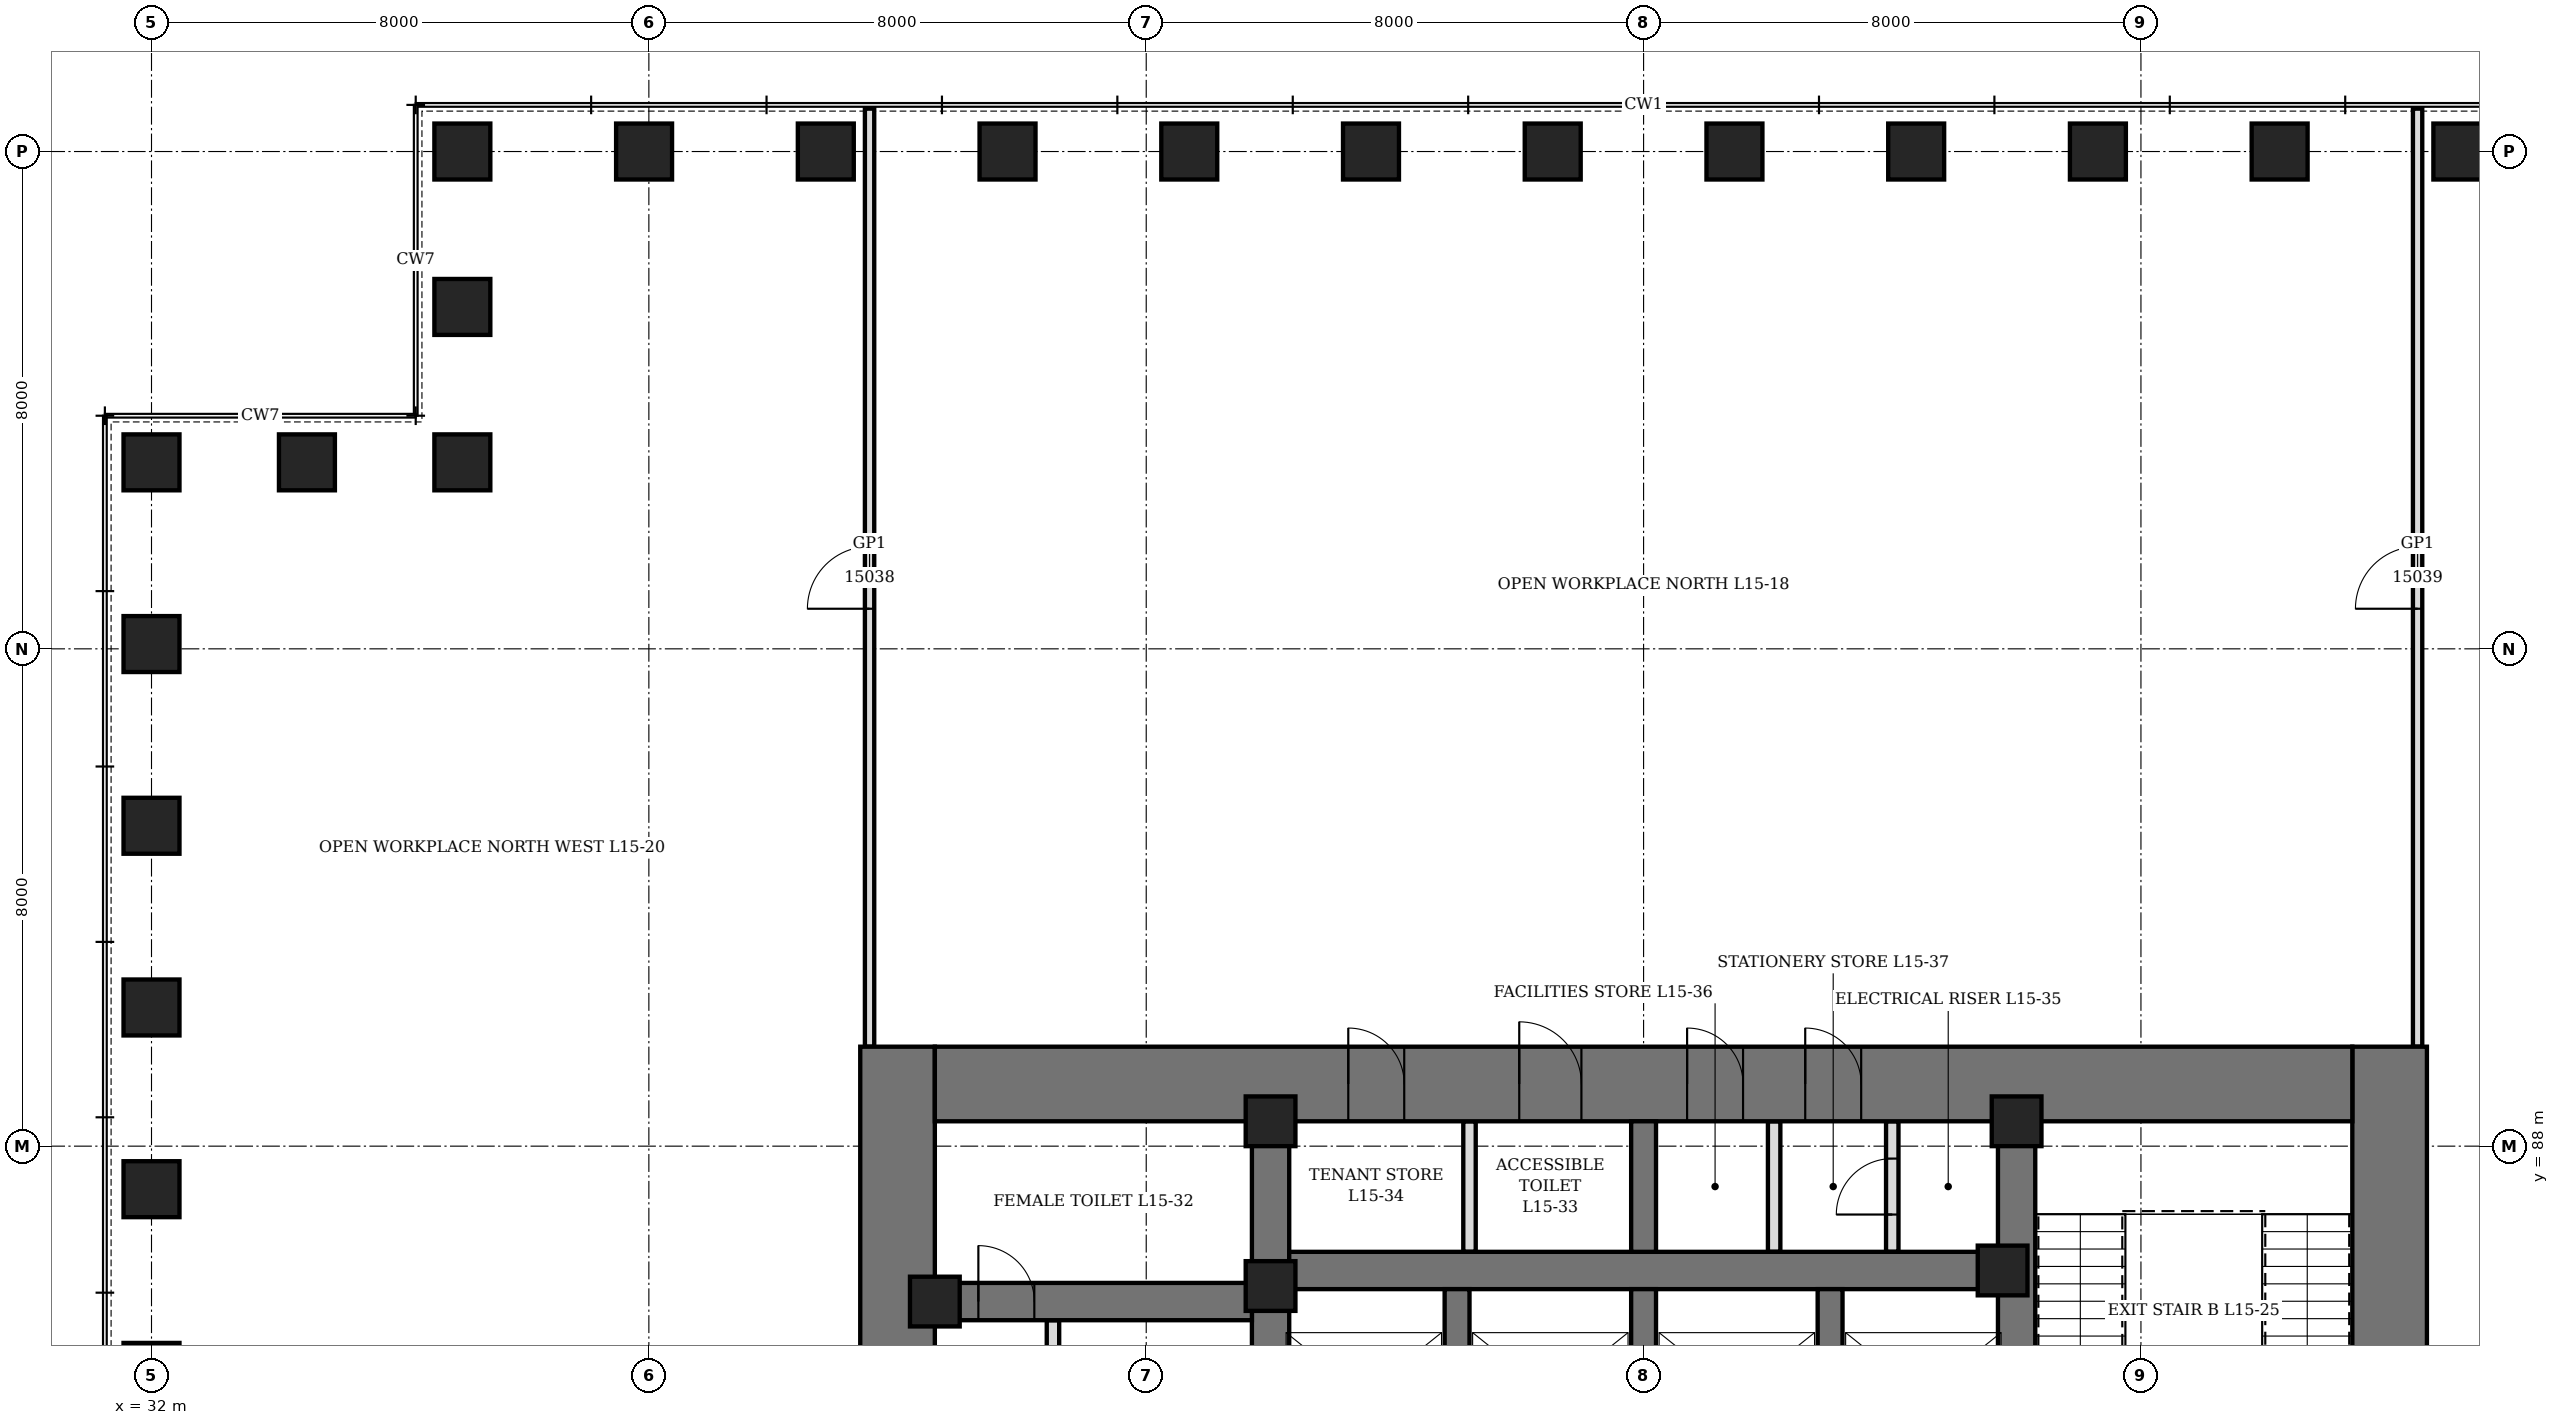
"""IFC4 building model, lengths in metres.
Left out: names, types, materials, properties, quantities, classifications, styles, units other than length and angle.
Written with IfcOpenShell. Run it as: python <this file> out.ifc"""

import sys

from ifc_helpers import new_model, si_unit, direction, frame, frame_2d, origin, origin_2d, place, context, subcontext, project, spatial, rectangle, hollow_rectangle, extrude, element, fill, save


model = new_model("IFC4")
c1 = context("Model", 3, precision=1e-05, world=origin(), true_north=direction((0.0, 1.0)))
c2 = subcontext(c1, "Body", "Model", "MODEL_VIEW")
j1 = project(units=[si_unit("LENGTHUNIT", "METRE"), si_unit("PLANEANGLEUNIT", "RADIAN")], contexts=[c1])
p1 = place(None, origin())
s1 = spatial("IfcSite", under=j1, at=p1, CompositionType="ELEMENT")
p2 = place(p1, origin())
s2 = spatial("IfcBuilding", under=s1, at=p2, CompositionType="ELEMENT")
p3 = place(p2, frame((0.0, 0.0, 72.7)))
s3 = spatial("IfcBuildingStorey", under=s2, at=p3, CompositionType="ELEMENT", Elevation=72.7)
for number, where, z_axis, x_axis in (
    (1, (69.154, 104.0, 0.0), (0.0, 0.0, 1.0), (1.0, 0.0, 0.0)),
    (2, (66.231, 104.0, 0.0), (0.0, 0.0, 1.0), (1.0, 0.0, 0.0)),
    (3, (63.308, 104.0, 0.0), (0.0, 0.0, 1.0), (1.0, 0.0, 0.0)),
    (4, (60.385, 104.0, 0.0), (0.0, 0.0, 1.0), (1.0, 0.0, 0.0)),
    (5, (57.461, 104.0, 0.0), (0.0, 0.0, 1.0), (1.0, 0.0, 0.0)),
    (6, (54.539, 104.0, 0.0), (0.0, 0.0, 1.0), (1.0, 0.0, 0.0)),
    (7, (51.615, 104.0, 0.0), (0.0, 0.0, 1.0), (1.0, 0.0, 0.0)),
    (8, (48.692, 104.0, 0.0), (0.0, 0.0, 1.0), (1.0, 0.0, 0.0)),
    (9, (45.769, 104.0, 0.0), (0.0, 0.0, 1.0), (1.0, 0.0, 0.0)),
    (10, (42.846, 104.0, 0.0), (0.0, 0.0, 1.0), (1.0, 0.0, 0.0)),
    (11, (39.923, 104.0, 0.0), (0.0, 0.0, 1.0), (1.0, 0.0, 0.0)),
    (12, (37.0, 104.0, 0.0), (0.0, 0.0, 1.0), (0.0, 1.0, 0.0)),
    (13, (37.0, 101.5, 0.0), (0.0, 0.0, 1.0), (0.0, 1.0, 0.0)),
    (14, (37.0, 99.0, 0.0), (0.0, 0.0, 1.0), (1.0, 0.0, 0.0)),
    (15, (34.5, 99.0, 0.0), (0.0, 0.0, 1.0), (1.0, 0.0, 0.0)),
    (16, (32.0, 99.0, 0.0), (0.0, 0.0, 1.0), (0.0, 1.0, 0.0)),
    (17, (32.0, 96.077, 0.0), (0.0, 0.0, 1.0), (0.0, 1.0, 0.0)),
    (18, (32.0, 93.154, 0.0), (0.0, 0.0, 1.0), (0.0, 1.0, 0.0)),
    (19, (32.0, 90.231, 0.0), (0.0, 0.0, 1.0), (0.0, 1.0, 0.0)),
    (20, (32.0, 87.308, 0.0), (0.0, 0.0, 1.0), (0.0, 1.0, 0.0)),
    (21, (32.0, 84.385, 0.0), (0.0, 0.0, 1.0), (0.0, 1.0, 0.0)),
):
    element("IfcColumn", number, at=place(p3, frame(where, z_axis=z_axis, x_axis=x_axis)), inside=s3, PredefinedType="COLUMN", context=c2, shape_type="SweptSolid", body=[
        extrude(hollow_rectangle(XDim=0.9, YDim=0.9, WallThickness=0.12, at=origin_2d()), origin(), (0.0, 0.0, 1.0), 4.2),
    ])
p4 = place(p3, frame((44.0, 70.4, 0.0), z_axis=(0.0, 0.0, 1.0), x_axis=(0.0, 1.0, 0.0)))
e22 = element("IfcWall", 22, at=p4, inside=s3, PredefinedType="SHEAR", context=c2, shape_type="SweptSolid", body=[
    extrude(rectangle(XDim=19.2, YDim=1.2, at=frame_2d((9.6, 0.0))), origin(), (0.0, 0.0, 1.0), 4.2),
])
p5 = place(p4, frame((8.6, 0.0, 0.0)))
e23 = element("IfcOpeningElement", 23, at=p5, cuts=e22, PredefinedType="OPENING", context=c2, shape_type="SweptSolid", body=[
    extrude(rectangle(XDim=2.0, YDim=2.4, at=frame_2d((1.0, 1.2))), frame((0.0, 0.61, 0.0), z_axis=(0.0, -1.0, 0.0), x_axis=(1.0, 0.0, 0.0)), (0.0, 0.0, 1.0), 1.22),
])
p6 = place(p3, frame((68.0, 70.4, 0.0), z_axis=(0.0, 0.0, 1.0), x_axis=(0.0, 1.0, 0.0)))
e24 = element("IfcWall", 24, at=p6, inside=s3, PredefinedType="SHEAR", context=c2, shape_type="SweptSolid", body=[
    extrude(rectangle(XDim=19.2, YDim=1.2, at=frame_2d((9.6, 0.0))), origin(), (0.0, 0.0, 1.0), 4.2),
])
p7 = place(p6, frame((8.6, 0.0, 0.0)))
e25 = element("IfcOpeningElement", 25, at=p7, cuts=e24, PredefinedType="OPENING", context=c2, shape_type="SweptSolid", body=[
    extrude(rectangle(XDim=2.0, YDim=2.4, at=frame_2d((1.0, 1.2))), frame((0.0, 0.61, 0.0), z_axis=(0.0, -1.0, 0.0), x_axis=(1.0, 0.0, 0.0)), (0.0, 0.0, 1.0), 1.22),
])
p8 = place(p3, frame((44.6, 89.0, 0.0), z_axis=(0.0, 0.0, 1.0), x_axis=(1.0, 0.0, 0.0)))
e26 = element("IfcWall", 26, at=p8, inside=s3, PredefinedType="SHEAR", context=c2, shape_type="SweptSolid", body=[
    extrude(rectangle(XDim=22.8, YDim=1.2, at=frame_2d((11.4, 0.0))), origin(), (0.0, 0.0, 1.0), 4.2),
])
p9 = place(p8, frame((9.4, 0.0, 0.0)))
e27 = element("IfcOpeningElement", 27, at=p9, cuts=e26, PredefinedType="OPENING", context=c2, shape_type="SweptSolid", body=[
    extrude(rectangle(XDim=1.0, YDim=2.1, at=frame_2d((0.5, 1.05))), frame((0.0, 0.61, 0.0), z_axis=(0.0, -1.0, 0.0), x_axis=(1.0, 0.0, 0.0)), (0.0, 0.0, 1.0), 1.22),
])
p10 = place(p8, frame((6.65, 0.0, 0.0)))
e28 = element("IfcOpeningElement", 28, at=p10, cuts=e26, PredefinedType="OPENING", context=c2, shape_type="SweptSolid", body=[
    extrude(rectangle(XDim=0.9, YDim=2.1, at=frame_2d((0.45, 1.05))), frame((0.0, 0.61, 0.0), z_axis=(0.0, -1.0, 0.0), x_axis=(1.0, 0.0, 0.0)), (0.0, 0.0, 1.0), 1.22),
])
p11 = place(p8, frame((12.1, 0.0, 0.0)))
e29 = element("IfcOpeningElement", 29, at=p11, cuts=e26, PredefinedType="OPENING", context=c2, shape_type="SweptSolid", body=[
    extrude(rectangle(XDim=0.9, YDim=2.1, at=frame_2d((0.45, 1.05))), frame((0.0, 0.61, 0.0), z_axis=(0.0, -1.0, 0.0), x_axis=(1.0, 0.0, 0.0)), (0.0, 0.0, 1.0), 1.22),
])
p12 = place(p8, frame((14.0, 0.0, 0.0)))
e30 = element("IfcOpeningElement", 30, at=p12, cuts=e26, PredefinedType="OPENING", context=c2, shape_type="SweptSolid", body=[
    extrude(rectangle(XDim=0.9, YDim=2.1, at=frame_2d((0.45, 1.05))), frame((0.0, 0.61, 0.0), z_axis=(0.0, -1.0, 0.0), x_axis=(1.0, 0.0, 0.0)), (0.0, 0.0, 1.0), 1.22),
])
p13 = place(p3, frame((50.0, 71.6, 0.0), z_axis=(0.0, 0.0, 1.0), x_axis=(0.0, 1.0, 0.0)))
e31 = element("IfcWall", 31, at=p13, inside=s3, PredefinedType="SHEAR", context=c2, shape_type="SweptSolid", body=[
    extrude(rectangle(XDim=16.8, YDim=0.6, at=frame_2d((8.4, 0.0))), origin(), (0.0, 0.0, 1.0), 4.2),
])
p14 = place(p13, frame((7.5, 0.0, 0.0)))
e32 = element("IfcOpeningElement", 32, at=p14, cuts=e31, PredefinedType="OPENING", context=c2, shape_type="SweptSolid", body=[
    extrude(rectangle(XDim=1.8, YDim=2.4, at=frame_2d((0.9, 1.2))), frame((0.0, 0.31, 0.0), z_axis=(0.0, -1.0, 0.0), x_axis=(1.0, 0.0, 0.0)), (0.0, 0.0, 1.0), 0.62),
])
p15 = place(p3, frame((62.0, 71.6, 0.0), z_axis=(0.0, 0.0, 1.0), x_axis=(0.0, 1.0, 0.0)))
e33 = element("IfcWall", 33, at=p15, inside=s3, PredefinedType="SHEAR", context=c2, shape_type="SweptSolid", body=[
    extrude(rectangle(XDim=16.8, YDim=0.6, at=frame_2d((8.4, 0.0))), origin(), (0.0, 0.0, 1.0), 4.2),
])
p16 = place(p15, frame((7.5, 0.0, 0.0)))
e34 = element("IfcOpeningElement", 34, at=p16, cuts=e33, PredefinedType="OPENING", context=c2, shape_type="SweptSolid", body=[
    extrude(rectangle(XDim=1.8, YDim=2.4, at=frame_2d((0.9, 1.2))), frame((0.0, 0.31, 0.0), z_axis=(0.0, -1.0, 0.0), x_axis=(1.0, 0.0, 0.0)), (0.0, 0.0, 1.0), 0.62),
])
p17 = place(p3, frame((44.6, 85.5, 0.0), z_axis=(0.0, 0.0, 1.0), x_axis=(1.0, 0.0, 0.0)))
e35 = element("IfcWall", 35, at=p17, inside=s3, PredefinedType="SHEAR", context=c2, shape_type="SweptSolid", body=[
    extrude(rectangle(XDim=5.1, YDim=0.6, at=frame_2d((2.55, 0.0))), origin(), (0.0, 0.0, 1.0), 4.2),
])
p18 = place(p17, frame((0.7, 0.0, 0.0)))
e36 = element("IfcOpeningElement", 36, at=p18, cuts=e35, PredefinedType="OPENING", context=c2, shape_type="SweptSolid", body=[
    extrude(rectangle(XDim=0.9, YDim=2.1, at=frame_2d((0.45, 1.05))), frame((0.0, 0.31, 0.0), z_axis=(0.0, -1.0, 0.0), x_axis=(1.0, 0.0, 0.0)), (0.0, 0.0, 1.0), 0.62),
])
p19 = place(p3, frame((50.3, 86.0, 0.0), z_axis=(0.0, 0.0, 1.0), x_axis=(1.0, 0.0, 0.0)))
e37 = element("IfcWall", 37, at=p19, inside=s3, PredefinedType="SHEAR", context=c2, shape_type="SweptSolid", body=[
    extrude(rectangle(XDim=11.4, YDim=0.6, at=frame_2d((5.7, 0.0))), origin(), (0.0, 0.0, 1.0), 4.2),
])
for number, where, z_axis, x_axis in (
    (38, (53.0, 82.3, 0.0), (0.0, 0.0, 1.0), (0.0, 1.0, 0.0)),
    (39, (56.0, 82.3, 0.0), (0.0, 0.0, 1.0), (0.0, 1.0, 0.0)),
    (40, (59.0, 82.3, 0.0), (0.0, 0.0, 1.0), (0.0, 1.0, 0.0)),
):
    element("IfcWall", number, at=place(p3, frame(where, z_axis=z_axis, x_axis=x_axis)), inside=s3, PredefinedType="SHEAR", context=c2, shape_type="SweptSolid", body=[
        extrude(rectangle(XDim=3.4, YDim=0.4, at=frame_2d((1.7, 0.0))), origin(), (0.0, 0.0, 1.0), 4.2),
    ])
p20 = place(p3, frame((56.0, 86.3, 0.0), z_axis=(0.0, 0.0, 1.0), x_axis=(0.0, 1.0, 0.0)))
e41 = element("IfcWall", 41, at=p20, inside=s3, PredefinedType="SHEAR", context=c2, shape_type="SweptSolid", body=[
    extrude(rectangle(XDim=2.1, YDim=0.4, at=frame_2d((1.05, 0.0))), origin(), (0.0, 0.0, 1.0), 4.2),
])
for number, where, z_axis, x_axis in (
    (42, (44.6, 85.5, 0.0), (0.0, 0.0, 1.0), (1.0, 0.0, 0.0)),
    (43, (50.0, 85.75, 0.0), (0.0, 0.0, 1.0), (1.0, 0.0, 0.0)),
    (44, (50.0, 88.4, 0.0), (0.0, 0.0, 1.0), (1.0, 0.0, 0.0)),
    (45, (61.775, 86.0, 0.0), (0.0, 0.0, 1.0), (1.0, 0.0, 0.0)),
    (46, (62.0, 88.4, 0.0), (0.0, 0.0, 1.0), (1.0, 0.0, 0.0)),
):
    element("IfcColumn", number, at=place(p3, frame(where, z_axis=z_axis, x_axis=x_axis)), inside=s3, PredefinedType="COLUMN", context=c2, shape_type="SweptSolid", body=[
        extrude(hollow_rectangle(XDim=0.8, YDim=0.8, WallThickness=0.1, at=origin_2d()), origin(), (0.0, 0.0, 1.0), 4.2),
    ])
p21 = place(p3, frame((46.5, 82.3, 0.0), z_axis=(0.0, 0.0, 1.0), x_axis=(0.0, 1.0, 0.0)))
e47 = element("IfcWall", 47, at=p21, inside=s3, PredefinedType="PARTITIONING", context=c2, shape_type="SweptSolid", body=[
    extrude(rectangle(XDim=2.9, YDim=0.2, at=frame_2d((1.45, 0.0))), origin(), (0.0, 0.0, 1.0), 4.04),
])
p22 = place(p21, frame((1.0, 0.0, 0.0)))
e48 = element("IfcOpeningElement", 48, at=p22, cuts=e47, PredefinedType="OPENING", context=c2, shape_type="SweptSolid", body=[
    extrude(rectangle(XDim=0.9, YDim=2.1, at=frame_2d((0.45, 1.05))), frame((0.0, 0.11, 0.0), z_axis=(0.0, -1.0, 0.0), x_axis=(1.0, 0.0, 0.0)), (0.0, 0.0, 1.0), 0.22),
])
p23 = place(p3, frame((53.2, 86.3, 0.0), z_axis=(0.0, 0.0, 1.0), x_axis=(0.0, 1.0, 0.0)))
e49 = element("IfcWall", 49, at=p23, inside=s3, PredefinedType="PARTITIONING", context=c2, shape_type="SweptSolid", body=[
    extrude(rectangle(XDim=2.1, YDim=0.2, at=frame_2d((1.05, 0.0))), origin(), (0.0, 0.0, 1.0), 4.04),
])
p24 = place(p3, frame((60.0, 86.3, 0.0), z_axis=(0.0, 0.0, 1.0), x_axis=(0.0, 1.0, 0.0)))
e50 = element("IfcWall", 50, at=p24, inside=s3, PredefinedType="PARTITIONING", context=c2, shape_type="SweptSolid", body=[
    extrude(rectangle(XDim=2.1, YDim=0.2, at=frame_2d((1.05, 0.0))), origin(), (0.0, 0.0, 1.0), 4.04),
])
p25 = place(p24, frame((0.6, 0.0, 0.0)))
e51 = element("IfcOpeningElement", 51, at=p25, cuts=e50, PredefinedType="OPENING", context=c2, shape_type="SweptSolid", body=[
    extrude(rectangle(XDim=0.9, YDim=2.1, at=frame_2d((0.45, 1.05))), frame((0.0, 0.11, 0.0), z_axis=(0.0, -1.0, 0.0), x_axis=(1.0, 0.0, 0.0)), (0.0, 0.0, 1.0), 0.22),
])
p26 = place(p3, frame((58.1, 86.3, 0.0), z_axis=(0.0, 0.0, 1.0), x_axis=(0.0, 1.0, 0.0)))
e52 = element("IfcWall", 52, at=p26, inside=s3, PredefinedType="PARTITIONING", context=c2, shape_type="SweptSolid", body=[
    extrude(rectangle(XDim=2.1, YDim=0.2, at=frame_2d((1.05, 0.0))), origin(), (0.0, 0.0, 1.0), 4.04),
])
p27 = place(p3, frame((43.55, 89.6, 0.0), z_axis=(0.0, 0.0, 1.0), x_axis=(0.0, 1.0, 0.0)))
e53 = element("IfcWall", 53, at=p27, inside=s3, PredefinedType="PARTITIONING", context=c2, shape_type="SweptSolid", body=[
    extrude(rectangle(XDim=15.09, YDim=0.15, at=frame_2d((7.545, 0.0))), origin(), (0.0, 0.0, 1.0), 4.04),
])
p28 = place(p27, frame((7.045, 0.0, 0.0)))
e54 = element("IfcOpeningElement", 54, at=p28, cuts=e53, PredefinedType="OPENING", context=c2, shape_type="SweptSolid", body=[
    extrude(rectangle(XDim=1.0, YDim=2.4, at=frame_2d((0.5, 1.2))), frame((0.0, 0.085, 0.0), z_axis=(0.0, -1.0, 0.0), x_axis=(1.0, 0.0, 0.0)), (0.0, 0.0, 1.0), 0.17),
])
p29 = place(p3, frame((68.45, 89.6, 0.0), z_axis=(0.0, 0.0, 1.0), x_axis=(0.0, 1.0, 0.0)))
e55 = element("IfcWall", 55, at=p29, inside=s3, PredefinedType="PARTITIONING", context=c2, shape_type="SweptSolid", body=[
    extrude(rectangle(XDim=15.09, YDim=0.15, at=frame_2d((7.545, 0.0))), origin(), (0.0, 0.0, 1.0), 4.04),
])
p30 = place(p29, frame((7.045, 0.0, 0.0)))
e56 = element("IfcOpeningElement", 56, at=p30, cuts=e55, PredefinedType="OPENING", context=c2, shape_type="SweptSolid", body=[
    extrude(rectangle(XDim=1.0, YDim=2.4, at=frame_2d((0.5, 1.2))), frame((0.0, 0.085, 0.0), z_axis=(0.0, -1.0, 0.0), x_axis=(1.0, 0.0, 0.0)), (0.0, 0.0, 1.0), 0.17),
])
p31 = place(p18, origin())
e57 = element("IfcDoor", 57, at=p31, inside=s3, OperationType="SINGLE_SWING_RIGHT", PredefinedType="DOOR", context=c2, shape_type="SweptSolid", body=[
    extrude(rectangle(XDim=0.9, YDim=2.1, at=frame_2d((0.45, 1.05))), frame((0.0, 0.3, 0.0), z_axis=(0.0, -1.0, 0.0), x_axis=(1.0, 0.0, 0.0)), (0.0, 0.0, 1.0), 0.6),
])
fill(e36, e57)
p32 = place(p9, origin())
e58 = element("IfcDoor", 58, at=p32, inside=s3, OperationType="SINGLE_SWING_LEFT", PredefinedType="DOOR", context=c2, shape_type="SweptSolid", body=[
    extrude(rectangle(XDim=1.0, YDim=2.1, at=frame_2d((0.5, 1.05))), frame((0.0, 0.35, 0.0), z_axis=(0.0, -1.0, 0.0), x_axis=(1.0, 0.0, 0.0)), (0.0, 0.0, 1.0), 0.7),
])
fill(e27, e58)
p33 = place(p10, origin())
e59 = element("IfcDoor", 59, at=p33, inside=s3, OperationType="SINGLE_SWING_LEFT", PredefinedType="DOOR", context=c2, shape_type="SweptSolid", body=[
    extrude(rectangle(XDim=0.9, YDim=2.1, at=frame_2d((0.45, 1.05))), frame((0.0, 0.35, 0.0), z_axis=(0.0, -1.0, 0.0), x_axis=(1.0, 0.0, 0.0)), (0.0, 0.0, 1.0), 0.7),
])
fill(e28, e59)
p34 = place(p11, origin())
e60 = element("IfcDoor", 60, at=p34, inside=s3, OperationType="SINGLE_SWING_LEFT", PredefinedType="DOOR", context=c2, shape_type="SweptSolid", body=[
    extrude(rectangle(XDim=0.9, YDim=2.1, at=frame_2d((0.45, 1.05))), frame((0.0, 0.35, 0.0), z_axis=(0.0, -1.0, 0.0), x_axis=(1.0, 0.0, 0.0)), (0.0, 0.0, 1.0), 0.7),
])
fill(e29, e60)
p35 = place(p12, origin())
e61 = element("IfcDoor", 61, at=p35, inside=s3, OperationType="SINGLE_SWING_LEFT", PredefinedType="DOOR", context=c2, shape_type="SweptSolid", body=[
    extrude(rectangle(XDim=0.9, YDim=2.1, at=frame_2d((0.45, 1.05))), frame((0.0, 0.35, 0.0), z_axis=(0.0, -1.0, 0.0), x_axis=(1.0, 0.0, 0.0)), (0.0, 0.0, 1.0), 0.7),
])
fill(e30, e61)
p36 = place(p25, origin())
e62 = element("IfcDoor", 62, at=p36, inside=s3, OperationType="SINGLE_SWING_LEFT", PredefinedType="DOOR", context=c2, shape_type="SweptSolid", body=[
    extrude(rectangle(XDim=0.9, YDim=2.1, at=frame_2d((0.45, 1.05))), frame((0.0, 0.1, 0.0), z_axis=(0.0, -1.0, 0.0), x_axis=(1.0, 0.0, 0.0)), (0.0, 0.0, 1.0), 0.199),
])
fill(e51, e62)
p37 = place(p28, origin())
e63 = element("IfcDoor", 63, at=p37, inside=s3, OperationType="SINGLE_SWING_RIGHT", PredefinedType="DOOR", context=c2, shape_type="SweptSolid", body=[
    extrude(rectangle(XDim=1.0, YDim=2.4, at=frame_2d((0.5, 1.2))), frame((0.0, 0.075, 0.0), z_axis=(0.0, -1.0, 0.0), x_axis=(1.0, 0.0, 0.0)), (0.0, 0.0, 1.0), 0.149),
])
fill(e54, e63)
p38 = place(p30, origin())
e64 = element("IfcDoor", 64, at=p38, inside=s3, OperationType="SINGLE_SWING_RIGHT", PredefinedType="DOOR", context=c2, shape_type="SweptSolid", body=[
    extrude(rectangle(XDim=1.0, YDim=2.4, at=frame_2d((0.5, 1.2))), frame((0.0, 0.075, 0.0), z_axis=(0.0, -1.0, 0.0), x_axis=(1.0, 0.0, 0.0)), (0.0, 0.0, 1.0), 0.149),
])
fill(e56, e64)
save(model, sys.argv[1])
